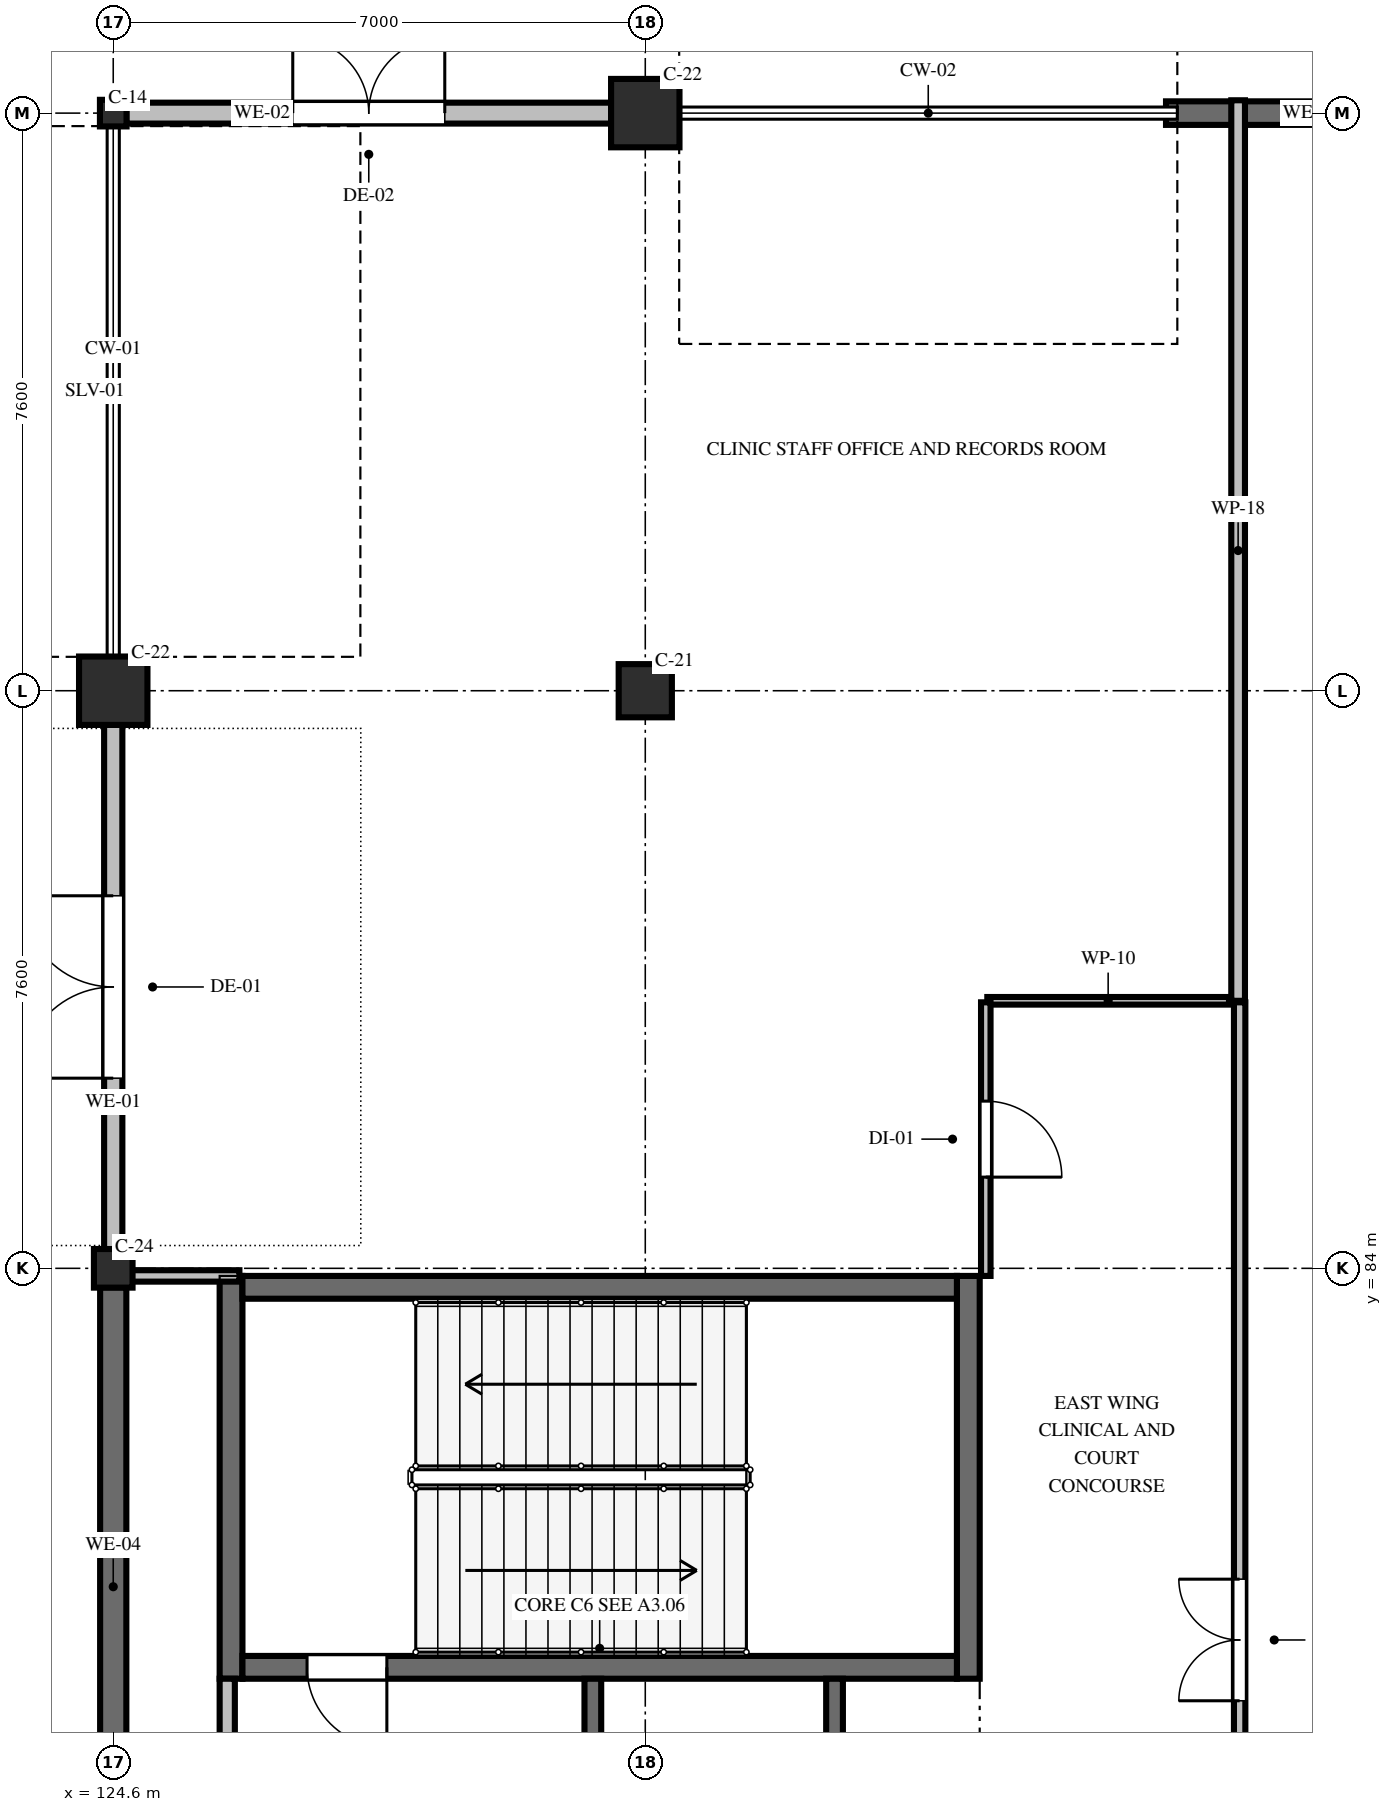
"""IFC4 building model, lengths in metres.
Left out: names, types, materials, properties, quantities, classifications, styles, units other than length and angle.
Written with IfcOpenShell. Run it as: python <this file> out.ifc"""

import sys

from ifc_helpers import new_model, si_unit, direction, frame, frame_2d, origin, origin_2d, place, context, subcontext, project, spatial, rectangle, hollow_rectangle, hollow_circle, i_section, extrude, element, fill, save


model = new_model("IFC4")
c1 = context("Model", 3, precision=1e-05, world=origin(), true_north=direction((0.0, 1.0)))
c2 = subcontext(c1, "Body", "Model", "MODEL_VIEW")
j1 = project(units=[si_unit("LENGTHUNIT", "METRE"), si_unit("PLANEANGLEUNIT", "RADIAN")], contexts=[c1])
p1 = place(None, origin())
s1 = spatial("IfcSite", under=j1, at=p1, CompositionType="ELEMENT")
p2 = place(p1, origin())
s2 = spatial("IfcBuilding", under=s1, at=p2, CompositionType="ELEMENT")
p3 = place(p2, origin())
s3 = spatial("IfcBuildingStorey", under=s2, at=p3, CompositionType="ELEMENT", Elevation=0.0)
p4 = place(p3, frame((124.6, 84.0, 0.0), z_axis=(0.0, 0.0, 1.0), x_axis=(1.0, 0.0, 0.0)))
e1 = element("IfcColumn", 1, at=p4, inside=s3, PredefinedType="COLUMN", context=c2, shape_type="SweptSolid", body=[
    extrude(hollow_circle(Radius=0.254, WallThickness=0.019, at=origin_2d()), origin(), (0.0, 0.0, 1.0), 5.4),
])
p5 = place(p3, frame((124.6, 91.6, 0.0), z_axis=(0.0, 0.0, 1.0), x_axis=(1.0, 0.0, 0.0)))
e2 = element("IfcColumn", 2, at=p5, inside=s3, PredefinedType="COLUMN", context=c2, shape_type="SweptSolid", body=[
    extrude(hollow_rectangle(XDim=0.9, YDim=0.9, WallThickness=0.036, InnerFilletRadius=0.036, OuterFilletRadius=0.072, at=origin_2d()), origin(), (0.0, 0.0, 1.0), 5.4),
])
p6 = place(p3, frame((124.6, 99.2, 0.0), z_axis=(0.0, 0.0, 1.0), x_axis=(1.0, 0.0, 0.0)))
e3 = element("IfcColumn", 3, at=p6, inside=s3, PredefinedType="COLUMN", context=c2, shape_type="SweptSolid", body=[
    extrude(i_section(OverallWidth=0.35, OverallDepth=0.35, WebThickness=0.012, FlangeThickness=0.019, FilletRadius=0.013, at=origin_2d()), origin(), (0.0, 0.0, 1.0), 5.4),
])
p7 = place(p3, frame((131.6, 91.6, 0.0), z_axis=(0.0, 0.0, 1.0), x_axis=(1.0, 0.0, 0.0)))
e4 = element("IfcColumn", 4, at=p7, inside=s3, PredefinedType="COLUMN", context=c2, shape_type="SweptSolid", body=[
    extrude(hollow_rectangle(XDim=0.7, YDim=0.7, WallThickness=0.028, InnerFilletRadius=0.028, OuterFilletRadius=0.056, at=origin_2d()), origin(), (0.0, 0.0, 1.0), 5.4),
])
p8 = place(p3, frame((131.6, 99.2, 0.0), z_axis=(0.0, 0.0, 1.0), x_axis=(1.0, 0.0, 0.0)))
e5 = element("IfcColumn", 5, at=p8, inside=s3, PredefinedType="COLUMN", context=c2, shape_type="SweptSolid", body=[
    extrude(hollow_rectangle(XDim=0.9, YDim=0.9, WallThickness=0.036, InnerFilletRadius=0.036, OuterFilletRadius=0.072, at=origin_2d()), origin(), (0.0, 0.0, 1.0), 5.4),
])
p9 = place(p3, frame((124.6, 75.871, 0.0), z_axis=(0.0, 0.0, 1.0), x_axis=(0.0, 1.0, 0.0)))
e6 = element("IfcWall", 6, at=p9, inside=s3, PredefinedType="SOLIDWALL", context=c2, shape_type="SweptSolid", body=[
    extrude(rectangle(XDim=7.879, YDim=0.345, at=frame_2d((3.939, 0.0))), origin(), (0.0, 0.0, 1.0), 4.674),
])
p10 = place(p3, frame((124.6, 84.25, 0.0), z_axis=(0.0, 0.0, 1.0), x_axis=(0.0, 1.0, 0.0)))
e7 = element("IfcWall", 7, at=p10, inside=s3, PredefinedType="SOLIDWALL", context=c2, shape_type="SweptSolid", body=[
    extrude(rectangle(XDim=6.904, YDim=0.24, at=frame_2d((3.452, 0.0))), origin(), (0.0, 0.0, 1.0), 4.578),
])
p11 = place(p10, frame((2.252, 0.0, 0.0)))
e8 = element("IfcOpeningElement", 8, at=p11, cuts=e7, PredefinedType="OPENING", context=c2, shape_type="SweptSolid", body=[
    extrude(rectangle(XDim=2.4, YDim=2.4, at=frame_2d((1.2, 1.2))), frame((0.0, 0.13, 0.0), z_axis=(0.0, -1.0, 0.0), x_axis=(1.0, 0.0, 0.0)), (0.0, 0.0, 1.0), 0.26),
])
p12 = place(p3, frame((124.771, 99.2, 0.0), z_axis=(0.0, 0.0, 1.0), x_axis=(1.0, 0.0, 0.0)))
e9 = element("IfcWall", 9, at=p12, inside=s3, PredefinedType="SOLIDWALL", context=c2, shape_type="SweptSolid", body=[
    extrude(rectangle(XDim=6.383, YDim=0.275, at=frame_2d((3.191, 0.0))), origin(), (0.0, 0.0, 1.0), 4.118),
])
p13 = place(p12, frame((2.191, 0.0, 0.0)))
e10 = element("IfcOpeningElement", 10, at=p13, cuts=e9, PredefinedType="OPENING", context=c2, shape_type="SweptSolid", body=[
    extrude(rectangle(XDim=2.0, YDim=2.3, at=frame_2d((1.0, 1.15))), frame((0.0, 0.147, 0.0), z_axis=(0.0, -1.0, 0.0), x_axis=(1.0, 0.0, 0.0)), (0.0, 0.0, 1.0), 0.295),
])
p14 = place(p3, frame((138.451, 99.2, 0.0), z_axis=(0.0, 0.0, 1.0), x_axis=(1.0, 0.0, 0.0)))
e11 = element("IfcWall", 11, at=p14, inside=s3, PredefinedType="SOLIDWALL", context=c2, shape_type="SweptSolid", body=[
    extrude(rectangle(XDim=6.803, YDim=0.31, at=frame_2d((3.401, 0.0))), origin(), (0.0, 0.0, 1.0), 3.468),
])
p15 = place(p14, frame((2.501, 0.0, 0.0)))
e12 = element("IfcOpeningElement", 12, at=p15, cuts=e11, PredefinedType="OPENING", context=c2, shape_type="SweptSolid", body=[
    extrude(rectangle(XDim=1.8, YDim=2.25, at=frame_2d((0.9, 1.125))), frame((0.0, 0.165, 0.0), z_axis=(0.0, -1.0, 0.0), x_axis=(1.0, 0.0, 0.0)), (0.0, 0.0, 1.0), 0.33),
])
for number, where, z_axis, x_axis in (
    (13, (126.15, 78.6, 0.0), (0.0, 0.0, 1.0), (0.0, 1.0, 0.0)),
    (14, (135.85, 83.9, 0.0), (0.0, 0.0, 1.0), (0.0, -1.0, 0.0)),
):
    element("IfcWall", number, at=place(p3, frame(where, z_axis=z_axis, x_axis=x_axis)), inside=s3, PredefinedType="SHEAR", context=c2, shape_type="SweptSolid", body=[
        extrude(rectangle(XDim=5.3, YDim=0.3, at=frame_2d((2.65, 0.0))), origin(), (0.0, 0.0, 1.0), 4.98),
    ])
p16 = place(p3, frame((135.7, 78.75, 0.0), z_axis=(0.0, 0.0, 1.0), x_axis=(-1.0, 0.0, 0.0)))
e15 = element("IfcWall", 15, at=p16, inside=s3, PredefinedType="SHEAR", context=c2, shape_type="SweptSolid", body=[
    extrude(rectangle(XDim=9.4, YDim=0.3, at=frame_2d((4.7, 0.0))), origin(), (0.0, 0.0, 1.0), 4.98),
])
p17 = place(p16, frame((7.5, 0.0, 0.0)))
e16 = element("IfcOpeningElement", 16, at=p17, cuts=e15, PredefinedType="OPENING", context=c2, shape_type="SweptSolid", body=[
    extrude(rectangle(XDim=1.05, YDim=2.2, at=frame_2d((0.525, 1.1))), frame((0.0, 0.16, 0.0), z_axis=(0.0, -1.0, 0.0), x_axis=(1.0, 0.0, 0.0)), (0.0, 0.0, 1.0), 0.32),
])
p18 = place(p3, frame((126.3, 83.75, 0.0), z_axis=(0.0, 0.0, 1.0), x_axis=(1.0, 0.0, 0.0)))
e17 = element("IfcWall", 17, at=p18, inside=s3, PredefinedType="SHEAR", context=c2, shape_type="SweptSolid", body=[
    extrude(rectangle(XDim=9.4, YDim=0.3, at=frame_2d((4.7, 0.0))), origin(), (0.0, 0.0, 1.0), 4.98),
])
p19 = place(p3, frame((126.1, 74.1, 0.0), z_axis=(0.0, 0.0, 1.0), x_axis=(0.0, 1.0, 0.0)))
e18 = element("IfcWall", 18, at=p19, inside=s3, PredefinedType="SOLIDWALL", context=c2, shape_type="SweptSolid", body=[
    extrude(rectangle(XDim=4.5, YDim=0.2, at=frame_2d((2.25, 0.0))), origin(), (0.0, 0.0, 1.0), 4.98),
])
p20 = place(p3, frame((130.91, 74.1, 0.0), z_axis=(0.0, 0.0, 1.0), x_axis=(0.0, 1.0, 0.0)))
e19 = element("IfcWall", 19, at=p20, inside=s3, PredefinedType="SOLIDWALL", context=c2, shape_type="SweptSolid", body=[
    extrude(rectangle(XDim=4.5, YDim=0.22, at=frame_2d((2.25, 0.0))), origin(), (0.0, 0.0, 1.0), 4.98),
])
p21 = place(p20, frame((1.65, 0.0, 0.0)))
e20 = element("IfcOpeningElement", 20, at=p21, cuts=e19, PredefinedType="OPENING", context=c2, shape_type="SweptSolid", body=[
    extrude(rectangle(XDim=1.2, YDim=2.2, at=frame_2d((0.6, 1.1))), frame((0.0, 0.12, 0.0), z_axis=(0.0, -1.0, 0.0), x_axis=(1.0, 0.0, 0.0)), (0.0, 0.0, 1.0), 0.24),
])
p22 = place(p3, frame((134.09, 74.1, 0.0), z_axis=(0.0, 0.0, 1.0), x_axis=(0.0, 1.0, 0.0)))
e21 = element("IfcWall", 21, at=p22, inside=s3, PredefinedType="SOLIDWALL", context=c2, shape_type="SweptSolid", body=[
    extrude(rectangle(XDim=4.5, YDim=0.22, at=frame_2d((2.25, 0.0))), origin(), (0.0, 0.0, 1.0), 4.98),
])
p23 = place(p3, frame((139.42, 70.72, 0.0), z_axis=(0.0, 0.0, 1.0), x_axis=(0.0, 1.0, 0.0)))
e22 = element("IfcWall", 22, at=p23, inside=s3, PredefinedType="PARTITIONING", context=c2, shape_type="SweptSolid", body=[
    extrude(rectangle(XDim=16.78, YDim=0.15, at=frame_2d((8.39, 0.0))), origin(), (0.0, 0.0, 1.0), 4.98),
])
p24 = place(p23, frame((7.59, 0.0, 0.0)))
e23 = element("IfcOpeningElement", 23, at=p24, cuts=e22, PredefinedType="OPENING", context=c2, shape_type="SweptSolid", body=[
    extrude(rectangle(XDim=1.6, YDim=2.2, at=frame_2d((0.8, 1.1))), frame((0.0, 0.085, 0.0), z_axis=(0.0, -1.0, 0.0), x_axis=(1.0, 0.0, 0.0)), (0.0, 0.0, 1.0), 0.17),
])
p25 = place(p3, frame((139.4, 87.52, 0.0), z_axis=(0.0, 0.0, 1.0), x_axis=(0.0, 1.0, 0.0)))
e24 = element("IfcWall", 24, at=p25, inside=s3, PredefinedType="PARTITIONING", context=c2, shape_type="SweptSolid", body=[
    extrude(rectangle(XDim=11.849, YDim=0.18, at=frame_2d((5.924, 0.0))), origin(), (0.0, 0.0, 1.0), 3.47),
])
p26 = place(p3, frame((139.28, 87.52, 0.0), z_axis=(0.0, 0.0, 1.0), x_axis=(-1.0, 0.0, 0.0)))
e25 = element("IfcWall", 25, at=p26, inside=s3, PredefinedType="PARTITIONING", context=c2, shape_type="SweptSolid", body=[
    extrude(rectangle(XDim=3.18, YDim=0.1, at=frame_2d((1.59, 0.0))), origin(), (0.0, 0.0, 1.0), 4.98),
])
p27 = place(p3, frame((136.08, 87.5, 0.0), z_axis=(0.0, 0.0, 1.0), x_axis=(0.0, -1.0, 0.0)))
e26 = element("IfcWall", 26, at=p27, inside=s3, PredefinedType="PARTITIONING", context=c2, shape_type="SweptSolid", body=[
    extrude(rectangle(XDim=3.6, YDim=0.125, at=frame_2d((1.8, 0.0))), origin(), (0.0, 0.0, 1.0), 4.98),
])
p28 = place(p27, frame((1.3, 0.0, 0.0)))
e27 = element("IfcOpeningElement", 27, at=p28, cuts=e26, PredefinedType="OPENING", context=c2, shape_type="SweptSolid", body=[
    extrude(rectangle(XDim=1.0, YDim=2.15, at=frame_2d((0.5, 1.075))), frame((0.0, 0.073, 0.0), z_axis=(0.0, -1.0, 0.0), x_axis=(1.0, 0.0, 0.0)), (0.0, 0.0, 1.0), 0.145),
])
p29 = place(p3, frame((126.26, 83.9, 0.0), z_axis=(0.0, 0.0, 1.0), x_axis=(-1.0, 0.0, 0.0)))
e28 = element("IfcWall", 28, at=p29, inside=s3, PredefinedType="PARTITIONING", context=c2, shape_type="SweptSolid", body=[
    extrude(rectangle(XDim=1.497, YDim=0.15, at=frame_2d((0.749, 0.0))), origin(), (0.0, 0.0, 1.0), 4.676),
])
p30 = place(p11, origin())
e29 = element("IfcDoor", 29, at=p30, inside=s3, OperationType="DOUBLE_DOOR_SINGLE_SWING", PredefinedType="DOOR", context=c2, shape_type="SweptSolid", body=[
    extrude(rectangle(XDim=2.4, YDim=2.4, at=frame_2d((1.2, 1.2))), frame((0.0, 0.025, 0.0), z_axis=(0.0, -1.0, 0.0), x_axis=(1.0, 0.0, 0.0)), (0.0, 0.0, 1.0), 0.05),
])
fill(e8, e29)
p31 = place(p13, origin())
e30 = element("IfcDoor", 30, at=p31, inside=s3, OperationType="DOUBLE_DOOR_SINGLE_SWING", PredefinedType="DOOR", context=c2, shape_type="SweptSolid", body=[
    extrude(rectangle(XDim=2.0, YDim=2.3, at=frame_2d((1.0, 1.15))), frame((0.0, 0.025, 0.0), z_axis=(0.0, -1.0, 0.0), x_axis=(1.0, 0.0, 0.0)), (0.0, 0.0, 1.0), 0.05),
])
fill(e10, e30)
p32 = place(p17, origin())
e31 = element("IfcDoor", 31, at=p32, inside=s3, OperationType="SINGLE_SWING_LEFT", PredefinedType="DOOR", context=c2, shape_type="SweptSolid", body=[
    extrude(rectangle(XDim=1.05, YDim=2.2, at=frame_2d((0.525, 1.1))), frame((0.0, 0.025, 0.0), z_axis=(0.0, -1.0, 0.0), x_axis=(1.0, 0.0, 0.0)), (0.0, 0.0, 1.0), 0.05),
])
fill(e16, e31)
p33 = place(p24, origin())
e32 = element("IfcDoor", 32, at=p33, inside=s3, OperationType="DOUBLE_DOOR_SINGLE_SWING", PredefinedType="DOOR", context=c2, shape_type="SweptSolid", body=[
    extrude(rectangle(XDim=1.6, YDim=2.2, at=frame_2d((0.8, 1.1))), frame((0.0, 0.025, 0.0), z_axis=(0.0, -1.0, 0.0), x_axis=(1.0, 0.0, 0.0)), (0.0, 0.0, 1.0), 0.05),
])
fill(e23, e32)
p34 = place(p28, origin())
e33 = element("IfcDoor", 33, at=p34, inside=s3, OperationType="SINGLE_SWING_RIGHT", PredefinedType="DOOR", context=c2, shape_type="SweptSolid", body=[
    extrude(rectangle(XDim=1.0, YDim=2.15, at=frame_2d((0.5, 1.075))), frame((0.0, 0.025, 0.0), z_axis=(0.0, -1.0, 0.0), x_axis=(1.0, 0.0, 0.0)), (0.0, 0.0, 1.0), 0.05),
])
fill(e27, e33)
save(model, sys.argv[1])
